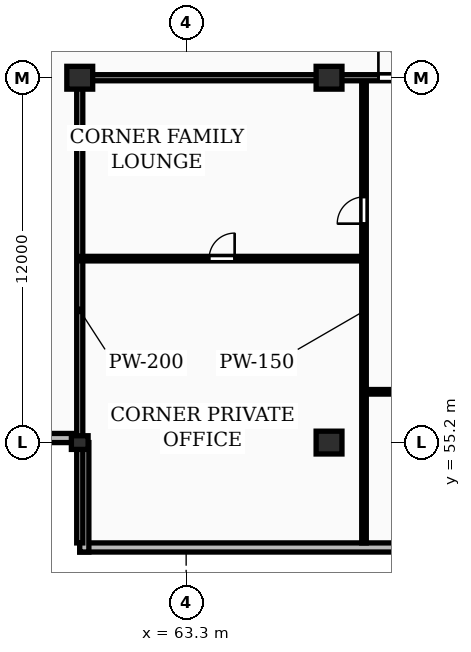
"""IFC4 building model, lengths in metres.
Left out: names, types, materials, properties, quantities, classifications, styles, units other than length and angle.
Written with IfcOpenShell. Run it as: python <this file> out.ifc"""

import sys

from ifc_helpers import new_model, si_unit, direction, frame, frame_2d, origin, origin_2d, place, context, subcontext, project, spatial, rectangle, extrude, element, fill, save


model = new_model("IFC4")
c1 = context("Model", 3, precision=1e-05, world=origin(), true_north=direction((0.0, 1.0)))
c2 = subcontext(c1, "Body", "Model", "MODEL_VIEW")
j1 = project(units=[si_unit("LENGTHUNIT", "METRE"), si_unit("PLANEANGLEUNIT", "RADIAN")], contexts=[c1])
p1 = place(None, origin())
s1 = spatial("IfcSite", under=j1, at=p1, CompositionType="ELEMENT")
p2 = place(p1, origin())
s2 = spatial("IfcBuilding", under=s1, at=p2, CompositionType="ELEMENT")
p3 = place(p2, frame((0.0, 0.0, 201.1)))
s3 = spatial("IfcBuildingStorey", under=s2, at=p3, CompositionType="ELEMENT", Elevation=201.1)
p4 = place(p3, frame((59.8, 55.2, 0.0), z_axis=(0.0, 0.0, 1.0), x_axis=(1.0, 0.0, 0.0)))
e1 = element("IfcColumn", 1, at=p4, inside=s3, PredefinedType="PILASTER", context=c2, shape_type="SweptSolid", body=[
    extrude(rectangle(XDim=0.55, YDim=0.45, at=origin_2d()), origin(), (0.0, 0.0, 1.0), 3.25),
])
for number, where, z_axis, x_axis in (
    (2, (59.8, 67.2, 0.0), (0.0, 0.0, 1.0), (1.0, 0.0, 0.0)),
    (3, (68.0, 55.2, 0.0), (0.0, 0.0, 1.0), (1.0, 0.0, 0.0)),
    (4, (68.0, 67.2, 0.0), (0.0, 0.0, 1.0), (1.0, 0.0, 0.0)),
):
    element("IfcColumn", number, at=place(p3, frame(where, z_axis=z_axis, x_axis=x_axis)), inside=s3, PredefinedType="COLUMN", context=c2, shape_type="SweptSolid", body=[
        extrude(rectangle(XDim=0.85, YDim=0.75, at=origin_2d()), origin(), (0.0, 0.0, 1.0), 3.25),
    ])
p5 = place(p3, frame((59.8, 51.75, 0.0), z_axis=(0.0, 0.0, 1.0), x_axis=(1.0, 0.0, 0.0)))
e5 = element("IfcWall", 5, at=p5, inside=s3, PredefinedType="STANDARD", context=c2, shape_type="SweptSolid", body=[
    extrude(rectangle(XDim=68.6, YDim=0.3, at=frame_2d((34.3, 0.0))), origin(), (0.0, 0.0, 1.0), 2.97),
])
p6 = place(p5, frame((13.025, 0.0, 0.85)))
e6 = element("IfcOpeningElement", 6, at=p6, cuts=e5, PredefinedType="OPENING", context=c2, shape_type="SweptSolid", body=[
    extrude(rectangle(XDim=1.8, YDim=1.8, at=frame_2d((0.9, 0.9))), frame((0.0, 0.16, 0.0), z_axis=(0.0, -1.0, 0.0), x_axis=(1.0, 0.0, 0.0)), (0.0, 0.0, 1.0), 0.32),
])
p7 = place(p5, frame((56.375, 0.0, 0.85)))
e7 = element("IfcOpeningElement", 7, at=p7, cuts=e5, PredefinedType="OPENING", context=c2, shape_type="SweptSolid", body=[
    extrude(rectangle(XDim=1.8, YDim=1.8, at=frame_2d((0.9, 0.9))), frame((0.0, 0.16, 0.0), z_axis=(0.0, -1.0, 0.0), x_axis=(1.0, 0.0, 0.0)), (0.0, 0.0, 1.0), 0.32),
])
p8 = place(p3, frame((56.2, 55.35, 0.0), z_axis=(0.0, 0.0, 1.0), x_axis=(1.0, 0.0, 0.0)))
e8 = element("IfcWall", 8, at=p8, inside=s3, PredefinedType="STANDARD", context=c2, shape_type="SweptSolid", body=[
    extrude(rectangle(XDim=3.6, YDim=0.3, at=frame_2d((1.8, 0.0))), origin(), (0.0, 0.0, 1.0), 2.97),
])
p9 = place(p3, frame((59.95, 55.2, 0.0), z_axis=(0.0, 0.0, 1.0), x_axis=(0.0, -1.0, 0.0)))
e9 = element("IfcWall", 9, at=p9, inside=s3, PredefinedType="STANDARD", context=c2, shape_type="SweptSolid", body=[
    extrude(rectangle(XDim=3.6, YDim=0.3, at=frame_2d((1.8, 0.0))), origin(), (0.0, 0.0, 1.0), 2.97),
])
p10 = place(p3, frame((59.8, 51.9, 0.0), z_axis=(0.0, 0.0, 1.0), x_axis=(0.0, 1.0, 0.0)))
e10 = element("IfcWall", 10, at=p10, inside=s3, PredefinedType="PARTITIONING", context=c2, shape_type="SweptSolid", body=[
    extrude(rectangle(XDim=15.3, YDim=0.2, at=frame_2d((7.65, 0.0))), origin(), (0.0, 0.0, 1.0), 2.277),
])
p11 = place(p3, frame((59.8, 61.25, 0.0), z_axis=(0.0, 0.0, 1.0), x_axis=(1.0, 0.0, 0.0)))
e11 = element("IfcWall", 11, at=p11, inside=s3, PredefinedType="PARTITIONING", context=c2, shape_type="SweptSolid", body=[
    extrude(rectangle(XDim=9.35, YDim=0.15, at=frame_2d((4.675, 0.0))), origin(), (0.0, 0.0, 1.0), 2.97),
])
p12 = place(p11, frame((4.255, 0.0, 0.0)))
e12 = element("IfcOpeningElement", 12, at=p12, cuts=e11, PredefinedType="OPENING", context=c2, shape_type="SweptSolid", body=[
    extrude(rectangle(XDim=0.84, YDim=2.04, at=frame_2d((0.42, 1.02))), frame((0.0, 0.085, 0.0), z_axis=(0.0, -1.0, 0.0), x_axis=(1.0, 0.0, 0.0)), (0.0, 0.0, 1.0), 0.17),
])
p13 = place(p3, frame((69.15, 51.9, 0.0), z_axis=(0.0, 0.0, 1.0), x_axis=(0.0, 1.0, 0.0)))
e13 = element("IfcWall", 13, at=p13, inside=s3, PredefinedType="PARTITIONING", context=c2, shape_type="SweptSolid", body=[
    extrude(rectangle(XDim=15.25, YDim=0.15, at=frame_2d((7.625, 0.0))), origin(), (0.0, 0.0, 1.0), 2.97),
])
p14 = place(p13, frame((10.5, 0.0, 0.0)))
e14 = element("IfcOpeningElement", 14, at=p14, cuts=e13, PredefinedType="OPENING", context=c2, shape_type="SweptSolid", body=[
    extrude(rectangle(XDim=0.88, YDim=2.06, at=frame_2d((0.44, 1.03))), frame((0.0, 0.085, 0.0), z_axis=(0.0, -1.0, 0.0), x_axis=(1.0, 0.0, 0.0)), (0.0, 0.0, 1.0), 0.17),
])
p15 = place(p3, frame((69.17, 56.87, 0.0), z_axis=(0.0, 0.0, 1.0), x_axis=(1.0, 0.0, 0.0)))
e15 = element("IfcWall", 15, at=p15, inside=s3, PredefinedType="PARTITIONING", context=c2, shape_type="SweptSolid", body=[
    extrude(rectangle(XDim=6.76, YDim=0.15, at=frame_2d((3.38, 0.0))), origin(), (0.0, 0.0, 1.0), 2.97),
])
p16 = place(p15, frame((1.362, 0.0, 0.0)))
e16 = element("IfcOpeningElement", 16, at=p16, cuts=e15, PredefinedType="OPENING", context=c2, shape_type="SweptSolid", body=[
    extrude(rectangle(XDim=0.84, YDim=2.04, at=frame_2d((0.42, 1.02))), frame((0.0, 0.085, 0.0), z_axis=(0.0, -1.0, 0.0), x_axis=(1.0, 0.0, 0.0)), (0.0, 0.0, 1.0), 0.17),
])
p17 = place(p15, frame((4.277, 0.0, 0.0)))
e17 = element("IfcOpeningElement", 17, at=p17, cuts=e15, PredefinedType="OPENING", context=c2, shape_type="SweptSolid", body=[
    extrude(rectangle(XDim=0.88, YDim=2.06, at=frame_2d((0.44, 1.03))), frame((0.0, 0.085, 0.0), z_axis=(0.0, -1.0, 0.0), x_axis=(1.0, 0.0, 0.0)), (0.0, 0.0, 1.0), 0.17),
])
p18 = place(p3, frame((59.8, 67.2, 0.0), z_axis=(0.0, 0.0, 1.0), x_axis=(1.0, 0.0, 0.0)))
e18 = element("IfcWall", 18, at=p18, inside=s3, PredefinedType="PARTITIONING", context=c2, shape_type="SweptSolid", body=[
    extrude(rectangle(XDim=16.15, YDim=0.2, at=frame_2d((8.075, 0.0))), origin(), (0.0, 0.0, 1.0), 2.433),
])
p19 = place(p18, frame((9.823, 0.0, 0.0)))
e19 = element("IfcOpeningElement", 19, at=p19, cuts=e18, PredefinedType="OPENING", context=c2, shape_type="SweptSolid", body=[
    extrude(rectangle(XDim=0.95, YDim=2.15, at=frame_2d((0.475, 1.075))), frame((0.0, 0.11, 0.0), z_axis=(0.0, -1.0, 0.0), x_axis=(1.0, 0.0, 0.0)), (0.0, 0.0, 1.0), 0.22),
])
p20 = place(p12, origin())
e20 = element("IfcDoor", 20, at=p20, inside=s3, OperationType="SINGLE_SWING_RIGHT", PredefinedType="DOOR", context=c2, shape_type="SweptSolid", body=[
    extrude(rectangle(XDim=0.84, YDim=2.04, at=frame_2d((0.42, 1.02))), frame((0.0, 0.025, 0.0), z_axis=(0.0, -1.0, 0.0), x_axis=(1.0, 0.0, 0.0)), (0.0, 0.0, 1.0), 0.05),
])
fill(e12, e20)
p21 = place(p14, origin())
e21 = element("IfcDoor", 21, at=p21, inside=s3, OperationType="SINGLE_SWING_LEFT", PredefinedType="DOOR", context=c2, shape_type="SweptSolid", body=[
    extrude(rectangle(XDim=0.88, YDim=2.06, at=frame_2d((0.44, 1.03))), frame((0.0, 0.025, 0.0), z_axis=(0.0, -1.0, 0.0), x_axis=(1.0, 0.0, 0.0)), (0.0, 0.0, 1.0), 0.05),
])
fill(e14, e21)
p22 = place(p19, origin())
e22 = element("IfcDoor", 22, at=p22, inside=s3, OperationType="SINGLE_SWING_LEFT", PredefinedType="DOOR", context=c2, shape_type="SweptSolid", body=[
    extrude(rectangle(XDim=0.95, YDim=2.15, at=frame_2d((0.475, 1.075))), frame((0.0, 0.025, 0.0), z_axis=(0.0, -1.0, 0.0), x_axis=(1.0, 0.0, 0.0)), (0.0, 0.0, 1.0), 0.05),
])
fill(e19, e22)
save(model, sys.argv[1])
